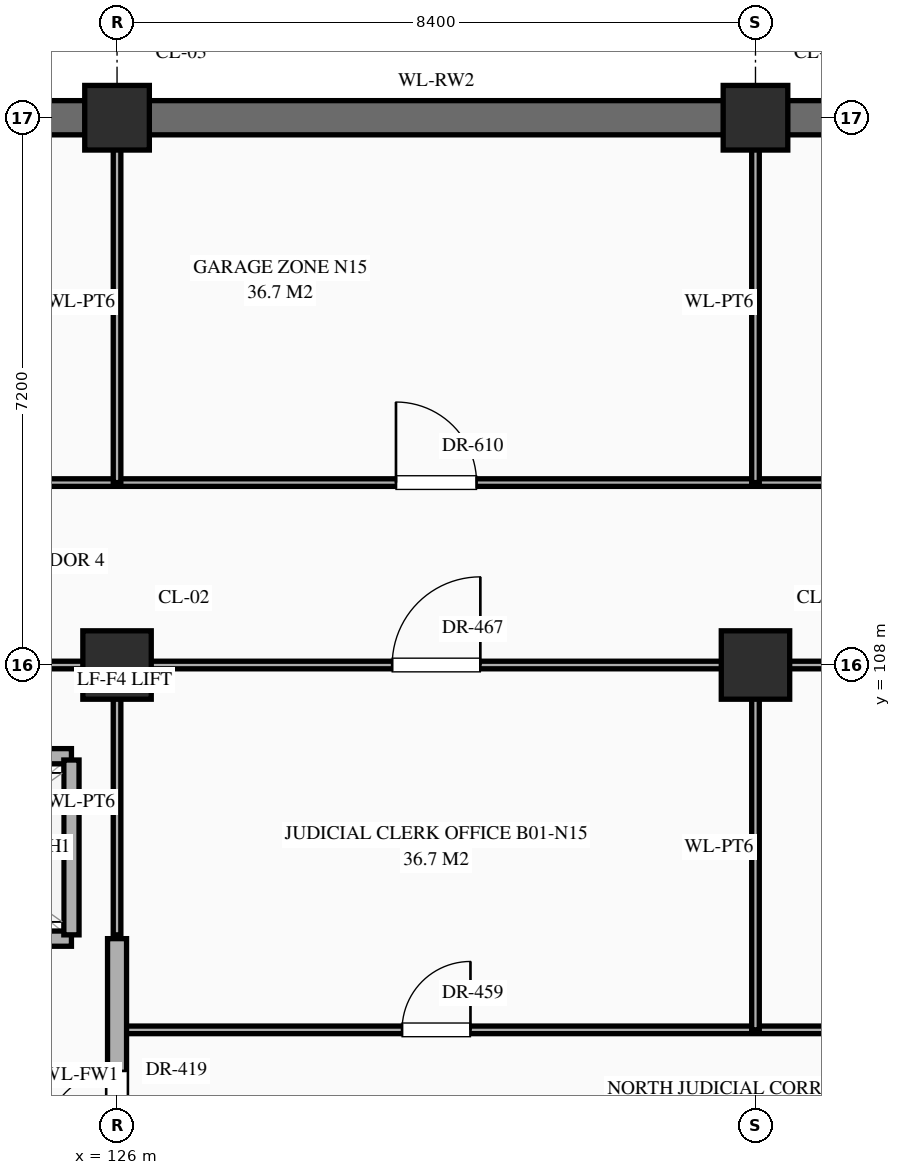
"""IFC4 building model, lengths in metres.
Left out: names, types, materials, properties, quantities, classifications, styles, units other than length and angle.
Written with IfcOpenShell. Run it as: python <this file> out.ifc"""

import sys

from ifc_helpers import new_model, si_unit, direction, frame, frame_2d, origin, origin_2d, place, context, subcontext, project, spatial, rectangle, extrude, element, fill, save


model = new_model("IFC4")
c1 = context("Model", 3, precision=1e-05, world=origin(), true_north=direction((0.0, 1.0)))
c2 = subcontext(c1, "Body", "Model", "MODEL_VIEW")
j1 = project(units=[si_unit("LENGTHUNIT", "METRE"), si_unit("PLANEANGLEUNIT", "RADIAN")], contexts=[c1])
p1 = place(None, origin())
s1 = spatial("IfcSite", under=j1, at=p1, CompositionType="ELEMENT")
p2 = place(p1, origin())
s2 = spatial("IfcBuilding", under=s1, at=p2, CompositionType="ELEMENT")
p3 = place(p2, frame((0.0, 0.0, -5.4)))
s3 = spatial("IfcBuildingStorey", under=s2, at=p3, CompositionType="ELEMENT", Elevation=-5.4)
p4 = place(p3, frame((126.0, 108.0, 0.0), z_axis=(0.0, 0.0, 1.0), x_axis=(1.0, 0.0, 0.0)))
e1 = element("IfcColumn", 1, at=p4, inside=s3, PredefinedType="COLUMN", context=c2, shape_type="SweptSolid", body=[
    extrude(rectangle(XDim=0.9, YDim=0.9, at=origin_2d()), origin(), (0.0, 0.0, 1.0), 5.4),
])
p5 = place(p3, frame((126.0, 115.2, 0.0), z_axis=(0.0, 0.0, 1.0), x_axis=(1.0, 0.0, 0.0)))
e2 = element("IfcColumn", 2, at=p5, inside=s3, PredefinedType="COLUMN", context=c2, shape_type="SweptSolid", body=[
    extrude(rectangle(XDim=0.85, YDim=0.85, at=origin_2d()), origin(), (0.0, 0.0, 1.0), 5.4),
])
p6 = place(p3, frame((134.4, 108.0, 0.0), z_axis=(0.0, 0.0, 1.0), x_axis=(1.0, 0.0, 0.0)))
e3 = element("IfcColumn", 3, at=p6, inside=s3, PredefinedType="COLUMN", context=c2, shape_type="SweptSolid", body=[
    extrude(rectangle(XDim=0.9, YDim=0.9, at=origin_2d()), origin(), (0.0, 0.0, 1.0), 5.4),
])
p7 = place(p3, frame((134.4, 115.2, 0.0), z_axis=(0.0, 0.0, 1.0), x_axis=(1.0, 0.0, 0.0)))
e4 = element("IfcColumn", 4, at=p7, inside=s3, PredefinedType="COLUMN", context=c2, shape_type="SweptSolid", body=[
    extrude(rectangle(XDim=0.85, YDim=0.85, at=origin_2d()), origin(), (0.0, 0.0, 1.0), 5.4),
])
p8 = place(p3, frame((118.045, 115.2, 0.0), z_axis=(0.0, 0.0, 1.0), x_axis=(1.0, 0.0, 0.0)))
e5 = element("IfcWall", 5, at=p8, inside=s3, PredefinedType="USERDEFINED", context=c2, shape_type="SweptSolid", body=[
    extrude(rectangle(XDim=7.535, YDim=0.45, at=frame_2d((3.768, 0.0))), origin(), (0.0, 0.0, 1.0), 4.98),
])
p9 = place(p3, frame((126.42, 115.2, 0.0), z_axis=(0.0, 0.0, 1.0), x_axis=(1.0, 0.0, 0.0)))
e6 = element("IfcWall", 6, at=p9, inside=s3, PredefinedType="USERDEFINED", context=c2, shape_type="SweptSolid", body=[
    extrude(rectangle(XDim=7.56, YDim=0.45, at=frame_2d((3.78, 0.0))), origin(), (0.0, 0.0, 1.0), 4.98),
])
p10 = place(p3, frame((134.82, 115.2, 0.0), z_axis=(0.0, 0.0, 1.0), x_axis=(1.0, 0.0, 0.0)))
e7 = element("IfcWall", 7, at=p10, inside=s3, PredefinedType="USERDEFINED", context=c2, shape_type="SweptSolid", body=[
    extrude(rectangle(XDim=7.56, YDim=0.45, at=frame_2d((3.78, 0.0))), origin(), (0.0, 0.0, 1.0), 4.98),
])
p11 = place(p3, frame((126.0, 103.2, 0.0), z_axis=(0.0, 0.0, 1.0), x_axis=(1.0, 0.0, 0.0)))
e8 = element("IfcWall", 8, at=p11, inside=s3, PredefinedType="STANDARD", context=c2, shape_type="SweptSolid", body=[
    extrude(rectangle(XDim=25.2, YDim=0.1, at=frame_2d((12.6, 0.0))), origin(), (0.0, 0.0, 1.0), 5.1),
])
p12 = place(p11, frame((3.75, 0.0, 0.0)))
e9 = element("IfcOpeningElement", 9, at=p12, cuts=e8, PredefinedType="OPENING", context=c2, shape_type="SweptSolid", body=[
    extrude(rectangle(XDim=0.9, YDim=2.15, at=frame_2d((0.45, 1.075))), frame((0.0, 0.062, 0.0), z_axis=(0.0, -1.0, 0.0), x_axis=(1.0, 0.0, 0.0)), (0.0, 0.0, 1.0), 0.124),
])
p13 = place(p11, frame((12.17, 0.0, 0.0)))
e10 = element("IfcOpeningElement", 10, at=p13, cuts=e8, PredefinedType="OPENING", context=c2, shape_type="SweptSolid", body=[
    extrude(rectangle(XDim=0.86, YDim=2.1, at=frame_2d((0.43, 1.05))), frame((0.0, 0.062, 0.0), z_axis=(0.0, -1.0, 0.0), x_axis=(1.0, 0.0, 0.0)), (0.0, 0.0, 1.0), 0.124),
])
p14 = place(p11, frame((20.54, 0.0, 0.0)))
e11 = element("IfcOpeningElement", 11, at=p14, cuts=e8, PredefinedType="OPENING", context=c2, shape_type="SweptSolid", body=[
    extrude(rectangle(XDim=0.92, YDim=2.15, at=frame_2d((0.46, 1.075))), frame((0.0, 0.062, 0.0), z_axis=(0.0, -1.0, 0.0), x_axis=(1.0, 0.0, 0.0)), (0.0, 0.0, 1.0), 0.124),
])
p15 = place(p3, frame((122.4, 104.4, 0.0), z_axis=(0.0, 0.0, 1.0), x_axis=(1.0, 0.0, 0.0)))
e12 = element("IfcWall", 12, at=p15, inside=s3, PredefinedType="STANDARD", context=c2, shape_type="SweptSolid", body=[
    extrude(rectangle(XDim=3.0, YDim=0.2, at=frame_2d((1.5, 0.0))), origin(), (0.0, 0.0, 1.0), 5.1),
])
p16 = place(p15, frame((0.9, 0.0, 0.0)))
e13 = element("IfcOpeningElement", 13, at=p16, cuts=e12, PredefinedType="OPENING", context=c2, shape_type="SweptSolid", body=[
    extrude(rectangle(XDim=1.2, YDim=2.15, at=frame_2d((0.6, 1.075))), frame((0.0, 0.112, 0.0), z_axis=(0.0, -1.0, 0.0), x_axis=(1.0, 0.0, 0.0)), (0.0, 0.0, 1.0), 0.224),
])
p17 = place(p3, frame((122.4, 106.8, 0.0), z_axis=(0.0, 0.0, 1.0), x_axis=(1.0, 0.0, 0.0)))
e14 = element("IfcWall", 14, at=p17, inside=s3, PredefinedType="STANDARD", context=c2, shape_type="SweptSolid", body=[
    extrude(rectangle(XDim=3.0, YDim=0.2, at=frame_2d((1.5, 0.0))), origin(), (0.0, 0.0, 1.0), 5.1),
])
p18 = place(p3, frame((121.85, 108.0, 0.0), z_axis=(0.0, 0.0, 1.0), x_axis=(1.0, 0.0, 0.0)))
e15 = element("IfcWall", 15, at=p18, inside=s3, PredefinedType="STANDARD", context=c2, shape_type="SweptSolid", body=[
    extrude(rectangle(XDim=4.1, YDim=0.1, at=frame_2d((2.05, 0.0))), origin(), (0.0, 0.0, 1.0), 4.13),
])
p19 = place(p3, frame((126.0, 108.0, 0.0), z_axis=(0.0, 0.0, 1.0), x_axis=(1.0, 0.0, 0.0)))
e16 = element("IfcWall", 16, at=p19, inside=s3, PredefinedType="STANDARD", context=c2, shape_type="SweptSolid", body=[
    extrude(rectangle(XDim=25.2, YDim=0.1, at=frame_2d((12.6, 0.0))), origin(), (0.0, 0.0, 1.0), 4.13),
])
p20 = place(p19, frame((3.62, 0.0, 0.0)))
e17 = element("IfcOpeningElement", 17, at=p20, cuts=e16, PredefinedType="OPENING", context=c2, shape_type="SweptSolid", body=[
    extrude(rectangle(XDim=1.16, YDim=2.3, at=frame_2d((0.58, 1.15))), frame((0.0, 0.062, 0.0), z_axis=(0.0, -1.0, 0.0), x_axis=(1.0, 0.0, 0.0)), (0.0, 0.0, 1.0), 0.124),
])
p21 = place(p19, frame((12.0, 0.0, 0.0)))
e18 = element("IfcOpeningElement", 18, at=p21, cuts=e16, PredefinedType="OPENING", context=c2, shape_type="SweptSolid", body=[
    extrude(rectangle(XDim=1.2, YDim=2.35, at=frame_2d((0.6, 1.175))), frame((0.0, 0.062, 0.0), z_axis=(0.0, -1.0, 0.0), x_axis=(1.0, 0.0, 0.0)), (0.0, 0.0, 1.0), 0.124),
])
p22 = place(p19, frame((20.393, 0.0, 0.0)))
e19 = element("IfcOpeningElement", 19, at=p22, cuts=e16, PredefinedType="OPENING", context=c2, shape_type="SweptSolid", body=[
    extrude(rectangle(XDim=1.24, YDim=2.3, at=frame_2d((0.62, 1.15))), frame((0.0, 0.062, 0.0), z_axis=(0.0, -1.0, 0.0), x_axis=(1.0, 0.0, 0.0)), (0.0, 0.0, 1.0), 0.124),
])
p23 = place(p3, frame((0.04, 110.4, 0.0), z_axis=(0.0, 0.0, 1.0), x_axis=(1.0, 0.0, 0.0)))
e20 = element("IfcWall", 20, at=p23, inside=s3, PredefinedType="STANDARD", context=c2, shape_type="SweptSolid", body=[
    extrude(rectangle(XDim=167.92, YDim=0.1, at=frame_2d((83.96, 0.0))), origin(), (0.0, 0.0, 1.0), 5.1),
])
p24 = place(p23, frame((3.65, 0.0, 0.0)))
e21 = element("IfcOpeningElement", 21, at=p24, cuts=e20, PredefinedType="OPENING", context=c2, shape_type="SweptSolid", body=[
    extrude(rectangle(XDim=1.06, YDim=2.4, at=frame_2d((0.53, 1.2))), frame((0.0, 0.062, 0.0), z_axis=(0.0, -1.0, 0.0), x_axis=(1.0, 0.0, 0.0)), (0.0, 0.0, 1.0), 0.124),
])
p25 = place(p23, frame((11.99, 0.0, 0.0)))
e22 = element("IfcOpeningElement", 22, at=p25, cuts=e20, PredefinedType="OPENING", context=c2, shape_type="SweptSolid", body=[
    extrude(rectangle(XDim=1.14, YDim=2.4, at=frame_2d((0.57, 1.2))), frame((0.0, 0.062, 0.0), z_axis=(0.0, -1.0, 0.0), x_axis=(1.0, 0.0, 0.0)), (0.0, 0.0, 1.0), 0.124),
])
p26 = place(p23, frame((20.51, 0.0, 0.0)))
e23 = element("IfcOpeningElement", 23, at=p26, cuts=e20, PredefinedType="OPENING", context=c2, shape_type="SweptSolid", body=[
    extrude(rectangle(XDim=0.9, YDim=2.15, at=frame_2d((0.45, 1.075))), frame((0.0, 0.062, 0.0), z_axis=(0.0, -1.0, 0.0), x_axis=(1.0, 0.0, 0.0)), (0.0, 0.0, 1.0), 0.124),
])
p27 = place(p23, frame((28.93, 0.0, 0.0)))
e24 = element("IfcOpeningElement", 24, at=p27, cuts=e20, PredefinedType="OPENING", context=c2, shape_type="SweptSolid", body=[
    extrude(rectangle(XDim=0.86, YDim=2.1, at=frame_2d((0.43, 1.05))), frame((0.0, 0.062, 0.0), z_axis=(0.0, -1.0, 0.0), x_axis=(1.0, 0.0, 0.0)), (0.0, 0.0, 1.0), 0.124),
])
p28 = place(p23, frame((37.3, 0.0, 0.0)))
e25 = element("IfcOpeningElement", 25, at=p28, cuts=e20, PredefinedType="OPENING", context=c2, shape_type="SweptSolid", body=[
    extrude(rectangle(XDim=0.92, YDim=2.15, at=frame_2d((0.46, 1.075))), frame((0.0, 0.062, 0.0), z_axis=(0.0, -1.0, 0.0), x_axis=(1.0, 0.0, 0.0)), (0.0, 0.0, 1.0), 0.124),
])
p29 = place(p23, frame((45.68, 0.0, 0.0)))
e26 = element("IfcOpeningElement", 26, at=p29, cuts=e20, PredefinedType="OPENING", context=c2, shape_type="SweptSolid", body=[
    extrude(rectangle(XDim=0.96, YDim=2.2, at=frame_2d((0.48, 1.1))), frame((0.0, 0.062, 0.0), z_axis=(0.0, -1.0, 0.0), x_axis=(1.0, 0.0, 0.0)), (0.0, 0.0, 1.0), 0.124),
])
p30 = place(p23, frame((54.04, 0.0, 0.0)))
e27 = element("IfcOpeningElement", 27, at=p30, cuts=e20, PredefinedType="OPENING", context=c2, shape_type="SweptSolid", body=[
    extrude(rectangle(XDim=1.04, YDim=2.2, at=frame_2d((0.52, 1.1))), frame((0.0, 0.062, 0.0), z_axis=(0.0, -1.0, 0.0), x_axis=(1.0, 0.0, 0.0)), (0.0, 0.0, 1.0), 0.124),
])
p31 = place(p23, frame((62.42, 0.0, 0.0)))
e28 = element("IfcOpeningElement", 28, at=p31, cuts=e20, PredefinedType="OPENING", context=c2, shape_type="SweptSolid", body=[
    extrude(rectangle(XDim=1.08, YDim=2.25, at=frame_2d((0.54, 1.125))), frame((0.0, 0.062, 0.0), z_axis=(0.0, -1.0, 0.0), x_axis=(1.0, 0.0, 0.0)), (0.0, 0.0, 1.0), 0.124),
])
p32 = place(p23, frame((70.8, 0.0, 0.0)))
e29 = element("IfcOpeningElement", 29, at=p32, cuts=e20, PredefinedType="OPENING", context=c2, shape_type="SweptSolid", body=[
    extrude(rectangle(XDim=1.12, YDim=2.25, at=frame_2d((0.56, 1.125))), frame((0.0, 0.062, 0.0), z_axis=(0.0, -1.0, 0.0), x_axis=(1.0, 0.0, 0.0)), (0.0, 0.0, 1.0), 0.124),
])
p33 = place(p23, frame((79.18, 0.0, 0.0)))
e30 = element("IfcOpeningElement", 30, at=p33, cuts=e20, PredefinedType="OPENING", context=c2, shape_type="SweptSolid", body=[
    extrude(rectangle(XDim=1.16, YDim=2.3, at=frame_2d((0.58, 1.15))), frame((0.0, 0.062, 0.0), z_axis=(0.0, -1.0, 0.0), x_axis=(1.0, 0.0, 0.0)), (0.0, 0.0, 1.0), 0.124),
])
p34 = place(p23, frame((87.54, 0.0, 0.0)))
e31 = element("IfcOpeningElement", 31, at=p34, cuts=e20, PredefinedType="OPENING", context=c2, shape_type="SweptSolid", body=[
    extrude(rectangle(XDim=1.24, YDim=2.3, at=frame_2d((0.62, 1.15))), frame((0.0, 0.062, 0.0), z_axis=(0.0, -1.0, 0.0), x_axis=(1.0, 0.0, 0.0)), (0.0, 0.0, 1.0), 0.124),
])
p35 = place(p23, frame((95.92, 0.0, 0.0)))
e32 = element("IfcOpeningElement", 32, at=p35, cuts=e20, PredefinedType="OPENING", context=c2, shape_type="SweptSolid", body=[
    extrude(rectangle(XDim=1.28, YDim=2.35, at=frame_2d((0.64, 1.175))), frame((0.0, 0.062, 0.0), z_axis=(0.0, -1.0, 0.0), x_axis=(1.0, 0.0, 0.0)), (0.0, 0.0, 1.0), 0.124),
])
p36 = place(p23, frame((104.49, 0.0, 0.0)))
e33 = element("IfcOpeningElement", 33, at=p36, cuts=e20, PredefinedType="OPENING", context=c2, shape_type="SweptSolid", body=[
    extrude(rectangle(XDim=0.94, YDim=2.3, at=frame_2d((0.47, 1.15))), frame((0.0, 0.062, 0.0), z_axis=(0.0, -1.0, 0.0), x_axis=(1.0, 0.0, 0.0)), (0.0, 0.0, 1.0), 0.124),
])
p37 = place(p23, frame((112.87, 0.0, 0.0)))
e34 = element("IfcOpeningElement", 34, at=p37, cuts=e20, PredefinedType="OPENING", context=c2, shape_type="SweptSolid", body=[
    extrude(rectangle(XDim=0.98, YDim=2.35, at=frame_2d((0.49, 1.175))), frame((0.0, 0.062, 0.0), z_axis=(0.0, -1.0, 0.0), x_axis=(1.0, 0.0, 0.0)), (0.0, 0.0, 1.0), 0.124),
])
p38 = place(p23, frame((121.25, 0.0, 0.0)))
e35 = element("IfcOpeningElement", 35, at=p38, cuts=e20, PredefinedType="OPENING", context=c2, shape_type="SweptSolid", body=[
    extrude(rectangle(XDim=1.02, YDim=2.4, at=frame_2d((0.51, 1.2))), frame((0.0, 0.062, 0.0), z_axis=(0.0, -1.0, 0.0), x_axis=(1.0, 0.0, 0.0)), (0.0, 0.0, 1.0), 0.124),
])
p39 = place(p23, frame((129.63, 0.0, 0.0)))
e36 = element("IfcOpeningElement", 36, at=p39, cuts=e20, PredefinedType="OPENING", context=c2, shape_type="SweptSolid", body=[
    extrude(rectangle(XDim=1.06, YDim=2.4, at=frame_2d((0.53, 1.2))), frame((0.0, 0.062, 0.0), z_axis=(0.0, -1.0, 0.0), x_axis=(1.0, 0.0, 0.0)), (0.0, 0.0, 1.0), 0.124),
])
p40 = place(p23, frame((137.99, 0.0, 0.0)))
e37 = element("IfcOpeningElement", 37, at=p40, cuts=e20, PredefinedType="OPENING", context=c2, shape_type="SweptSolid", body=[
    extrude(rectangle(XDim=1.14, YDim=2.4, at=frame_2d((0.57, 1.2))), frame((0.0, 0.062, 0.0), z_axis=(0.0, -1.0, 0.0), x_axis=(1.0, 0.0, 0.0)), (0.0, 0.0, 1.0), 0.124),
])
p41 = place(p23, frame((146.51, 0.0, 0.0)))
e38 = element("IfcOpeningElement", 38, at=p41, cuts=e20, PredefinedType="OPENING", context=c2, shape_type="SweptSolid", body=[
    extrude(rectangle(XDim=0.9, YDim=2.15, at=frame_2d((0.45, 1.075))), frame((0.0, 0.062, 0.0), z_axis=(0.0, -1.0, 0.0), x_axis=(1.0, 0.0, 0.0)), (0.0, 0.0, 1.0), 0.124),
])
p42 = place(p23, frame((154.93, 0.0, 0.0)))
e39 = element("IfcOpeningElement", 39, at=p42, cuts=e20, PredefinedType="OPENING", context=c2, shape_type="SweptSolid", body=[
    extrude(rectangle(XDim=0.86, YDim=2.1, at=frame_2d((0.43, 1.05))), frame((0.0, 0.062, 0.0), z_axis=(0.0, -1.0, 0.0), x_axis=(1.0, 0.0, 0.0)), (0.0, 0.0, 1.0), 0.124),
])
p43 = place(p23, frame((163.28, 0.0, 0.0)))
e40 = element("IfcOpeningElement", 40, at=p43, cuts=e20, PredefinedType="OPENING", context=c2, shape_type="SweptSolid", body=[
    extrude(rectangle(XDim=0.92, YDim=2.15, at=frame_2d((0.46, 1.075))), frame((0.0, 0.062, 0.0), z_axis=(0.0, -1.0, 0.0), x_axis=(1.0, 0.0, 0.0)), (0.0, 0.0, 1.0), 0.124),
])
p44 = place(p3, frame((125.4, 104.45, 0.0), z_axis=(0.0, 0.0, 1.0), x_axis=(0.0, 1.0, 0.0)))
e41 = element("IfcWall", 41, at=p44, inside=s3, PredefinedType="STANDARD", context=c2, shape_type="SweptSolid", body=[
    extrude(rectangle(XDim=2.3, YDim=0.2, at=frame_2d((1.15, 0.0))), origin(), (0.0, 0.0, 1.0), 5.1),
])
p45 = place(p3, frame((126.0, 100.8, 0.0), z_axis=(0.0, 0.0, 1.0), x_axis=(0.0, 1.0, 0.0)))
e42 = element("IfcWall", 42, at=p45, inside=s3, PredefinedType="STANDARD", context=c2, shape_type="SweptSolid", body=[
    extrude(rectangle(XDim=3.6, YDim=0.25, at=frame_2d((1.8, 0.0))), origin(), (0.0, 0.0, 1.0), 4.35),
])
p46 = place(p45, frame((0.91, 0.0, 0.0)))
e43 = element("IfcOpeningElement", 43, at=p46, cuts=e42, PredefinedType="OPENING", context=c2, shape_type="SweptSolid", body=[
    extrude(rectangle(XDim=0.95, YDim=2.15, at=frame_2d((0.475, 1.075))), frame((0.0, 0.137, 0.0), z_axis=(0.0, -1.0, 0.0), x_axis=(1.0, 0.0, 0.0)), (0.0, 0.0, 1.0), 0.274),
])
p47 = place(p3, frame((126.0, 104.45, 0.0), z_axis=(0.0, 0.0, 1.0), x_axis=(0.0, 1.0, 0.0)))
e44 = element("IfcWall", 44, at=p47, inside=s3, PredefinedType="STANDARD", context=c2, shape_type="SweptSolid", body=[
    extrude(rectangle(XDim=3.5, YDim=0.1, at=frame_2d((1.75, 0.0))), origin(), (0.0, 0.0, 1.0), 4.35),
])
p48 = place(p3, frame((126.0, 110.4, 0.0), z_axis=(0.0, 0.0, 1.0), x_axis=(0.0, 1.0, 0.0)))
e45 = element("IfcWall", 45, at=p48, inside=s3, PredefinedType="STANDARD", context=c2, shape_type="SweptSolid", body=[
    extrude(rectangle(XDim=4.76, YDim=0.1, at=frame_2d((2.38, 0.0))), origin(), (0.0, 0.0, 1.0), 4.23),
])
p49 = place(p3, frame((134.4, 103.2, 0.0), z_axis=(0.0, 0.0, 1.0), x_axis=(0.0, 1.0, 0.0)))
e46 = element("IfcWall", 46, at=p49, inside=s3, PredefinedType="STANDARD", context=c2, shape_type="SweptSolid", body=[
    extrude(rectangle(XDim=4.8, YDim=0.1, at=frame_2d((2.4, 0.0))), origin(), (0.0, 0.0, 1.0), 4.35),
])
p50 = place(p3, frame((134.4, 110.4, 0.0), z_axis=(0.0, 0.0, 1.0), x_axis=(0.0, 1.0, 0.0)))
e47 = element("IfcWall", 47, at=p50, inside=s3, PredefinedType="STANDARD", context=c2, shape_type="SweptSolid", body=[
    extrude(rectangle(XDim=4.76, YDim=0.1, at=frame_2d((2.38, 0.0))), origin(), (0.0, 0.0, 1.0), 4.23),
])
p51 = place(p46, origin())
e48 = element("IfcDoor", 48, at=p51, inside=s3, OperationType="SINGLE_SWING_LEFT", PredefinedType="DOOR", context=c2, shape_type="SweptSolid", body=[
    extrude(rectangle(XDim=0.95, YDim=2.15, at=frame_2d((0.475, 1.075))), frame((0.0, 0.025, 0.0), z_axis=(0.0, -1.0, 0.0), x_axis=(1.0, 0.0, 0.0)), (0.0, 0.0, 1.0), 0.05),
])
fill(e43, e48)
p52 = place(p12, origin())
e49 = element("IfcDoor", 49, at=p52, inside=s3, OperationType="SINGLE_SWING_RIGHT", PredefinedType="DOOR", context=c2, shape_type="SweptSolid", body=[
    extrude(rectangle(XDim=0.9, YDim=2.15, at=frame_2d((0.45, 1.075))), frame((0.0, 0.025, 0.0), z_axis=(0.0, -1.0, 0.0), x_axis=(1.0, 0.0, 0.0)), (0.0, 0.0, 1.0), 0.05),
])
fill(e9, e49)
p53 = place(p20, origin())
e50 = element("IfcDoor", 50, at=p53, inside=s3, OperationType="SINGLE_SWING_RIGHT", PredefinedType="DOOR", context=c2, shape_type="SweptSolid", body=[
    extrude(rectangle(XDim=1.16, YDim=2.3, at=frame_2d((0.58, 1.15))), frame((0.0, 0.025, 0.0), z_axis=(0.0, -1.0, 0.0), x_axis=(1.0, 0.0, 0.0)), (0.0, 0.0, 1.0), 0.05),
])
fill(e17, e50)
p54 = place(p39, origin())
e51 = element("IfcDoor", 51, at=p54, inside=s3, OperationType="SINGLE_SWING_LEFT", PredefinedType="DOOR", context=c2, shape_type="SweptSolid", body=[
    extrude(rectangle(XDim=1.06, YDim=2.4, at=frame_2d((0.53, 1.2))), frame((0.0, 0.025, 0.0), z_axis=(0.0, -1.0, 0.0), x_axis=(1.0, 0.0, 0.0)), (0.0, 0.0, 1.0), 0.05),
])
fill(e36, e51)
save(model, sys.argv[1])
